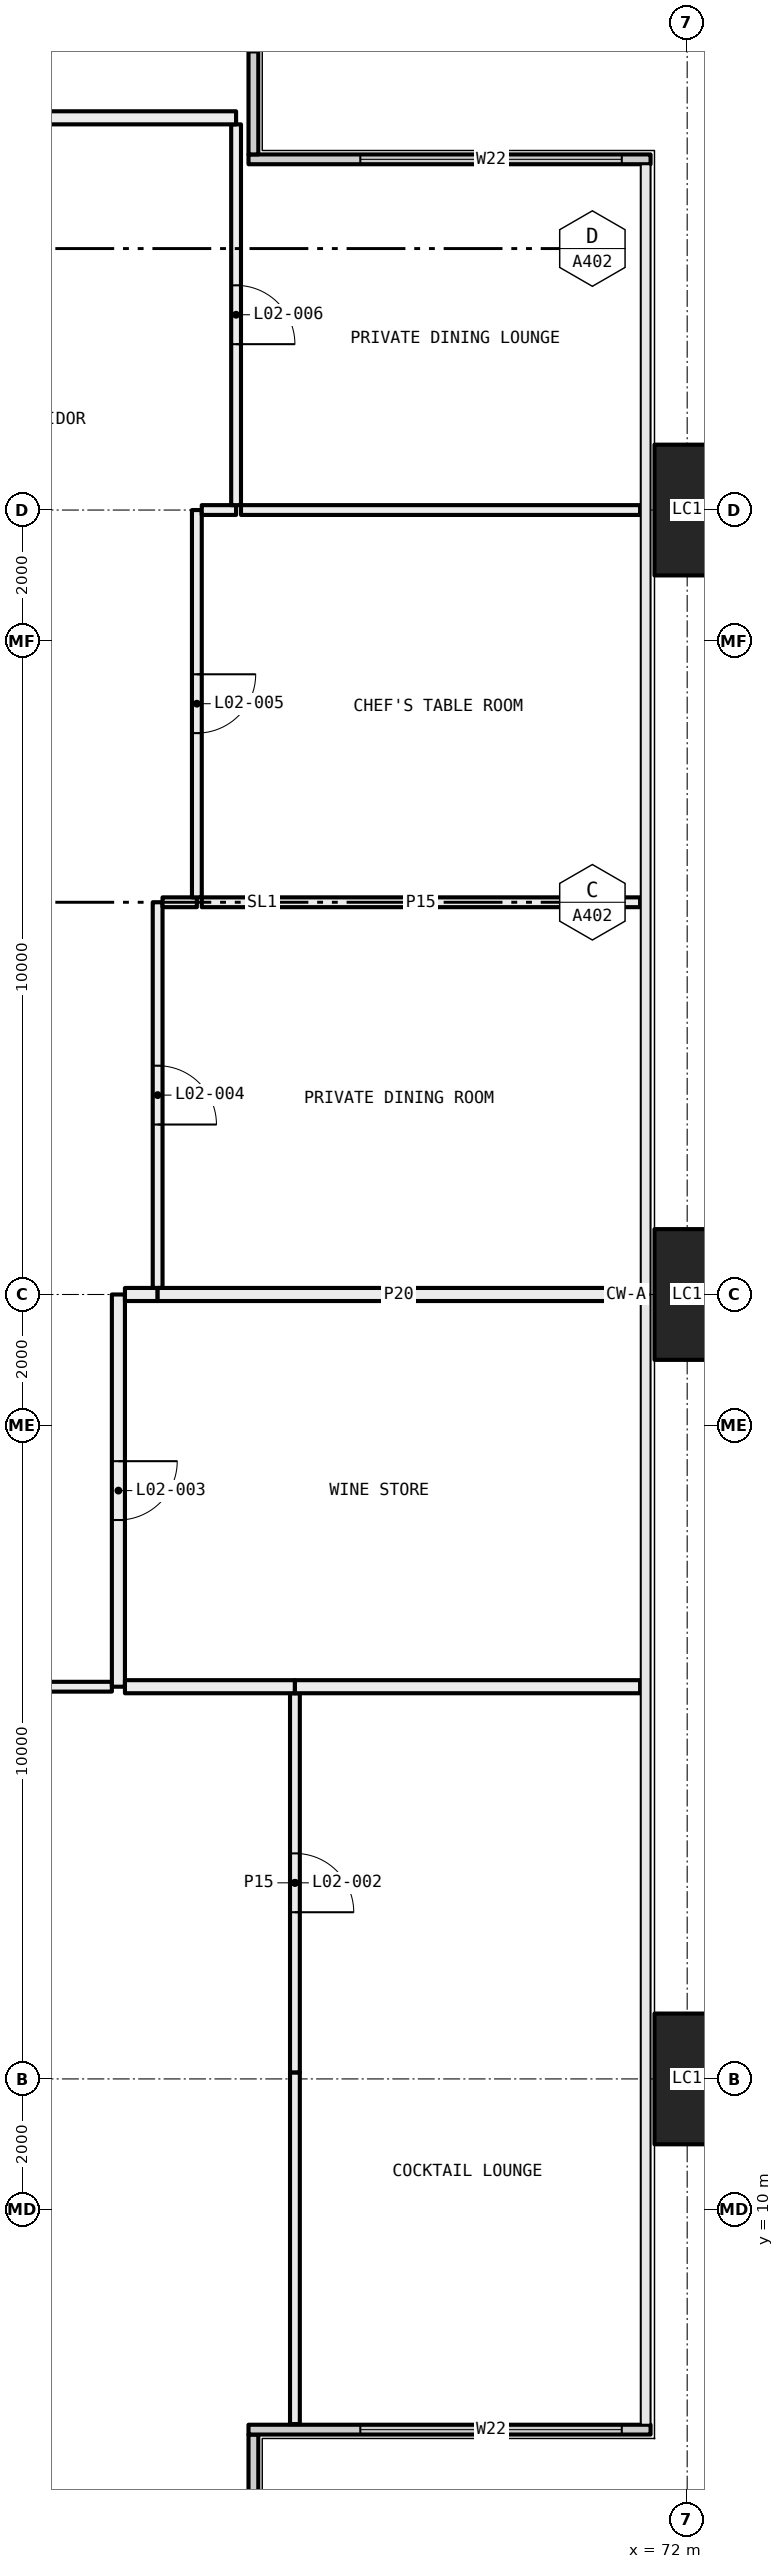
"""IFC4 building model, lengths in metres.
Left out: names, types, materials, properties, quantities, classifications, styles, units other than length and angle.
Written with IfcOpenShell. Run it as: python <this file> out.ifc"""

import sys

from ifc_helpers import new_model, si_unit, direction, frame, frame_2d, origin, origin_2d, place, context, subcontext, project, spatial, rectangle, hollow_rectangle, extrude, element, fill, save


model = new_model("IFC4")
c1 = context("Model", 3, precision=1e-05, world=origin(), true_north=direction((0.0, 1.0)))
c2 = subcontext(c1, "Body", "Model", "MODEL_VIEW")
j1 = project(units=[si_unit("LENGTHUNIT", "METRE"), si_unit("PLANEANGLEUNIT", "RADIAN")], contexts=[c1])
p1 = place(None, origin())
s1 = spatial("IfcSite", under=j1, at=p1, CompositionType="ELEMENT")
p2 = place(p1, origin())
s2 = spatial("IfcBuilding", under=s1, at=p2, CompositionType="ELEMENT")
p3 = place(p2, frame((0.0, 0.0, 12.0)))
s3 = spatial("IfcBuildingStorey", under=s2, at=p3, CompositionType="ELEMENT", Elevation=12.0)
for number, where, z_axis, x_axis in (
    (1, (72.0, 12.0, -0.4), (0.0, 0.0, 1.0), (0.0, 1.0, 0.0)),
    (2, (72.0, 24.0, -0.4), (0.0, 0.0, 1.0), (0.0, 1.0, 0.0)),
    (3, (72.0, 36.0, -0.4), (0.0, 0.0, 1.0), (0.0, 1.0, 0.0)),
):
    element("IfcColumn", number, at=place(p3, frame(where, z_axis=z_axis, x_axis=x_axis)), inside=s3, PredefinedType="COLUMN", context=c2, shape_type="SweptSolid", body=[
        extrude(hollow_rectangle(XDim=2.0, YDim=1.0, WallThickness=0.08, at=origin_2d()), origin(), (0.0, 0.0, 1.0), 6.0),
    ])
p4 = place(p3, frame((65.365, 0.71, 0.0), z_axis=(0.0, 0.0, 1.0), x_axis=(0.0, 1.0, 0.0)))
e4 = element("IfcWall", 4, at=p4, inside=s3, PredefinedType="ELEMENTEDWALL", context=c2, shape_type="SweptSolid", body=[
    extrude(rectangle(XDim=5.85, YDim=0.15, at=frame_2d((2.925, 0.0))), origin(), (0.0, 0.0, 1.0), 5.6),
])
p5 = place(p4, frame((0.29, 0.0, 0.45)))
e5 = element("IfcOpeningElement", 5, at=p5, cuts=e4, PredefinedType="OPENING", context=c2, shape_type="SweptSolid", body=[
    extrude(rectangle(XDim=4.0, YDim=5.1, at=frame_2d((2.0, 2.55))), frame((0.0, 0.085, 0.0), z_axis=(0.0, -1.0, 0.0), x_axis=(1.0, 0.0, 0.0)), (0.0, 0.0, 1.0), 0.17),
])
p6 = place(p3, frame((65.29, 6.635, 0.0), z_axis=(0.0, 0.0, 1.0), x_axis=(1.0, 0.0, 0.0)))
e6 = element("IfcWall", 6, at=p6, inside=s3, PredefinedType="ELEMENTEDWALL", context=c2, shape_type="SweptSolid", body=[
    extrude(rectangle(XDim=6.15, YDim=0.15, at=frame_2d((3.075, 0.0))), origin(), (0.0, 0.0, 1.0), 5.6),
])
p7 = place(p6, frame((1.71, 0.0, 0.45)))
e7 = element("IfcOpeningElement", 7, at=p7, cuts=e6, PredefinedType="OPENING", context=c2, shape_type="SweptSolid", body=[
    extrude(rectangle(XDim=4.0, YDim=5.1, at=frame_2d((2.0, 2.55))), frame((0.0, 0.085, 0.0), z_axis=(0.0, -1.0, 0.0), x_axis=(1.0, 0.0, 0.0)), (0.0, 0.0, 1.0), 0.17),
])
p8 = place(p3, frame((65.29, 41.365, 0.0), z_axis=(0.0, 0.0, 1.0), x_axis=(1.0, 0.0, 0.0)))
e8 = element("IfcWall", 8, at=p8, inside=s3, PredefinedType="ELEMENTEDWALL", context=c2, shape_type="SweptSolid", body=[
    extrude(rectangle(XDim=6.15, YDim=0.15, at=frame_2d((3.075, 0.0))), origin(), (0.0, 0.0, 1.0), 5.6),
])
p9 = place(p8, frame((1.71, 0.0, 0.45)))
e9 = element("IfcOpeningElement", 9, at=p9, cuts=e8, PredefinedType="OPENING", context=c2, shape_type="SweptSolid", body=[
    extrude(rectangle(XDim=4.0, YDim=5.1, at=frame_2d((2.0, 2.55))), frame((0.0, 0.085, 0.0), z_axis=(0.0, -1.0, 0.0), x_axis=(1.0, 0.0, 0.0)), (0.0, 0.0, 1.0), 0.17),
])
p10 = place(p3, frame((65.365, 41.44, 0.0), z_axis=(0.0, 0.0, 1.0), x_axis=(0.0, 1.0, 0.0)))
e10 = element("IfcWall", 10, at=p10, inside=s3, PredefinedType="ELEMENTEDWALL", context=c2, shape_type="SweptSolid", body=[
    extrude(rectangle(XDim=5.85, YDim=0.15, at=frame_2d((2.925, 0.0))), origin(), (0.0, 0.0, 1.0), 5.6),
])
p11 = place(p10, frame((1.56, 0.0, 0.45)))
e11 = element("IfcOpeningElement", 11, at=p11, cuts=e10, PredefinedType="OPENING", context=c2, shape_type="SweptSolid", body=[
    extrude(rectangle(XDim=4.0, YDim=5.1, at=frame_2d((2.0, 2.55))), frame((0.0, 0.085, 0.0), z_axis=(0.0, -1.0, 0.0), x_axis=(1.0, 0.0, 0.0)), (0.0, 0.0, 1.0), 0.17),
])
p12 = place(p3, frame((48.72, 18.0, 0.0), z_axis=(0.0, 0.0, 1.0), x_axis=(1.0, 0.0, 0.0)))
e12 = element("IfcWall", 12, at=p12, inside=s3, PredefinedType="PARTITIONING", context=c2, shape_type="SweptSolid", body=[
    extrude(rectangle(XDim=14.48, YDim=0.15, at=frame_2d((7.24, 0.0))), origin(), (0.0, 0.0, 1.0), 5.6),
])
p13 = place(p12, frame((6.44, 0.0, 0.0)))
e13 = element("IfcOpeningElement", 13, at=p13, cuts=e12, PredefinedType="OPENING", context=c2, shape_type="SweptSolid", body=[
    extrude(rectangle(XDim=1.6, YDim=2.1, at=frame_2d((0.8, 1.05))), frame((0.0, 0.085, 0.0), z_axis=(0.0, -1.0, 0.0), x_axis=(1.0, 0.0, 0.0)), (0.0, 0.0, 1.0), 0.17),
])
p14 = place(p3, frame((63.3, 18.0, 0.0), z_axis=(0.0, 0.0, 1.0), x_axis=(0.0, 1.0, 0.0)))
e14 = element("IfcWall", 14, at=p14, inside=s3, PredefinedType="PARTITIONING", context=c2, shape_type="SweptSolid", body=[
    extrude(rectangle(XDim=6.0, YDim=0.2, at=frame_2d((3.0, 0.0))), origin(), (0.0, 0.0, 1.0), 5.0),
])
p15 = place(p14, frame((2.55, 0.0, 0.0)))
e15 = element("IfcOpeningElement", 15, at=p15, cuts=e14, PredefinedType="OPENING", context=c2, shape_type="SweptSolid", body=[
    extrude(rectangle(XDim=0.9, YDim=2.1, at=frame_2d((0.45, 1.05))), frame((0.0, 0.11, 0.0), z_axis=(0.0, -1.0, 0.0), x_axis=(1.0, 0.0, 0.0)), (0.0, 0.0, 1.0), 0.22),
])
p16 = place(p3, frame((63.4, 24.0, 0.0), z_axis=(0.0, 0.0, 1.0), x_axis=(1.0, 0.0, 0.0)))
e16 = element("IfcWall", 16, at=p16, inside=s3, PredefinedType="PARTITIONING", context=c2, shape_type="SweptSolid", body=[
    extrude(rectangle(XDim=0.5, YDim=0.2, at=frame_2d((0.25, 0.0))), origin(), (0.0, 0.0, 1.0), 5.0),
])
p17 = place(p3, frame((63.9, 24.1, 0.0), z_axis=(0.0, 0.0, 1.0), x_axis=(0.0, 1.0, 0.0)))
e17 = element("IfcWall", 17, at=p17, inside=s3, PredefinedType="PARTITIONING", context=c2, shape_type="SweptSolid", body=[
    extrude(rectangle(XDim=5.9, YDim=0.15, at=frame_2d((2.95, 0.0))), origin(), (0.0, 0.0, 1.0), 5.6),
])
p18 = place(p17, frame((2.5, 0.0, 0.0)))
e18 = element("IfcOpeningElement", 18, at=p18, cuts=e17, PredefinedType="OPENING", context=c2, shape_type="SweptSolid", body=[
    extrude(rectangle(XDim=0.9, YDim=2.1, at=frame_2d((0.45, 1.05))), frame((0.0, 0.085, 0.0), z_axis=(0.0, -1.0, 0.0), x_axis=(1.0, 0.0, 0.0)), (0.0, 0.0, 1.0), 0.17),
])
p19 = place(p3, frame((63.975, 30.0, 0.0), z_axis=(0.0, 0.0, 1.0), x_axis=(1.0, 0.0, 0.0)))
e19 = element("IfcWall", 19, at=p19, inside=s3, PredefinedType="PARTITIONING", context=c2, shape_type="SweptSolid", body=[
    extrude(rectangle(XDim=0.525, YDim=0.15, at=frame_2d((0.262, 0.0))), origin(), (0.0, 0.0, 1.0), 5.6),
])
p20 = place(p3, frame((64.5, 30.075, 0.0), z_axis=(0.0, 0.0, 1.0), x_axis=(0.0, 1.0, 0.0)))
e20 = element("IfcWall", 20, at=p20, inside=s3, PredefinedType="PARTITIONING", context=c2, shape_type="SweptSolid", body=[
    extrude(rectangle(XDim=5.925, YDim=0.15, at=frame_2d((2.962, 0.0))), origin(), (0.0, 0.0, 1.0), 5.0),
])
p21 = place(p20, frame((2.512, 0.0, 0.0)))
e21 = element("IfcOpeningElement", 21, at=p21, cuts=e20, PredefinedType="OPENING", context=c2, shape_type="SweptSolid", body=[
    extrude(rectangle(XDim=0.9, YDim=2.1, at=frame_2d((0.45, 1.05))), frame((0.0, 0.085, 0.0), z_axis=(0.0, -1.0, 0.0), x_axis=(1.0, 0.0, 0.0)), (0.0, 0.0, 1.0), 0.17),
])
p22 = place(p3, frame((64.575, 36.0, 0.0), z_axis=(0.0, 0.0, 1.0), x_axis=(1.0, 0.0, 0.0)))
e22 = element("IfcWall", 22, at=p22, inside=s3, PredefinedType="PARTITIONING", context=c2, shape_type="SweptSolid", body=[
    extrude(rectangle(XDim=0.525, YDim=0.15, at=frame_2d((0.263, 0.0))), origin(), (0.0, 0.0, 1.0), 5.0),
])
p23 = place(p3, frame((65.1, 36.075, 0.0), z_axis=(0.0, 0.0, 1.0), x_axis=(0.0, 1.0, 0.0)))
e23 = element("IfcWall", 23, at=p23, inside=s3, PredefinedType="PARTITIONING", context=c2, shape_type="SweptSolid", body=[
    extrude(rectangle(XDim=5.825, YDim=0.15, at=frame_2d((2.913, 0.0))), origin(), (0.0, 0.0, 1.0), 5.0),
])
p24 = place(p23, frame((2.462, 0.0, 0.0)))
e24 = element("IfcOpeningElement", 24, at=p24, cuts=e23, PredefinedType="OPENING", context=c2, shape_type="SweptSolid", body=[
    extrude(rectangle(XDim=0.9, YDim=2.1, at=frame_2d((0.45, 1.05))), frame((0.0, 0.085, 0.0), z_axis=(0.0, -1.0, 0.0), x_axis=(1.0, 0.0, 0.0)), (0.0, 0.0, 1.0), 0.17),
])
p25 = place(p3, frame((65.1, 42.0, 0.0), z_axis=(0.0, 0.0, 1.0), x_axis=(-1.0, 0.0, 0.0)))
e25 = element("IfcWall", 25, at=p25, inside=s3, PredefinedType="PARTITIONING", context=c2, shape_type="SweptSolid", body=[
    extrude(rectangle(XDim=11.1, YDim=0.2, at=frame_2d((5.55, 0.0))), origin(), (0.0, 0.0, 1.0), 5.6),
])
p26 = place(p25, frame((5.1, 0.0, 0.0)))
e26 = element("IfcOpeningElement", 26, at=p26, cuts=e25, PredefinedType="OPENING", context=c2, shape_type="SweptSolid", body=[
    extrude(rectangle(XDim=0.9, YDim=2.1, at=frame_2d((0.45, 1.05))), frame((0.0, 0.11, 0.0), z_axis=(0.0, -1.0, 0.0), x_axis=(1.0, 0.0, 0.0)), (0.0, 0.0, 1.0), 0.22),
])
p27 = place(p3, frame((66.0, 6.72, 0.0), z_axis=(0.0, 0.0, 1.0), x_axis=(0.0, 1.0, 0.0)))
e27 = element("IfcWall", 27, at=p27, inside=s3, PredefinedType="PARTITIONING", context=c2, shape_type="SweptSolid", body=[
    extrude(rectangle(XDim=5.38, YDim=0.15, at=frame_2d((2.69, 0.0))), origin(), (0.0, 0.0, 1.0), 5.0),
])
p28 = place(p3, frame((66.0, 12.1, 0.0), z_axis=(0.0, 0.0, 1.0), x_axis=(0.0, 1.0, 0.0)))
e28 = element("IfcWall", 28, at=p28, inside=s3, PredefinedType="PARTITIONING", context=c2, shape_type="SweptSolid", body=[
    extrude(rectangle(XDim=5.8, YDim=0.15, at=frame_2d((2.9, 0.0))), origin(), (0.0, 0.0, 1.0), 5.6),
])
p29 = place(p28, frame((2.45, 0.0, 0.0)))
e29 = element("IfcOpeningElement", 29, at=p29, cuts=e28, PredefinedType="OPENING", context=c2, shape_type="SweptSolid", body=[
    extrude(rectangle(XDim=0.9, YDim=2.1, at=frame_2d((0.45, 1.05))), frame((0.0, 0.085, 0.0), z_axis=(0.0, -1.0, 0.0), x_axis=(1.0, 0.0, 0.0)), (0.0, 0.0, 1.0), 0.17),
])
p30 = place(p3, frame((66.0, 18.0, 0.0), z_axis=(0.0, 0.0, 1.0), x_axis=(-1.0, 0.0, 0.0)))
e30 = element("IfcWall", 30, at=p30, inside=s3, PredefinedType="PARTITIONING", context=c2, shape_type="SweptSolid", body=[
    extrude(rectangle(XDim=2.6, YDim=0.2, at=frame_2d((1.3, 0.0))), origin(), (0.0, 0.0, 1.0), 5.6),
])
p31 = place(p3, frame((71.28, 18.0, 0.0), z_axis=(0.0, 0.0, 1.0), x_axis=(-1.0, 0.0, 0.0)))
e31 = element("IfcWall", 31, at=p31, inside=s3, PredefinedType="PARTITIONING", context=c2, shape_type="SweptSolid", body=[
    extrude(rectangle(XDim=5.28, YDim=0.2, at=frame_2d((2.64, 0.0))), origin(), (0.0, 0.0, 1.0), 5.6),
])
p32 = place(p3, frame((71.28, 24.0, 0.0), z_axis=(0.0, 0.0, 1.0), x_axis=(-1.0, 0.0, 0.0)))
e32 = element("IfcWall", 32, at=p32, inside=s3, PredefinedType="PARTITIONING", context=c2, shape_type="SweptSolid", body=[
    extrude(rectangle(XDim=7.38, YDim=0.2, at=frame_2d((3.69, 0.0))), origin(), (0.0, 0.0, 1.0), 5.0),
])
p33 = place(p3, frame((71.28, 30.0, 0.0), z_axis=(0.0, 0.0, 1.0), x_axis=(-1.0, 0.0, 0.0)))
e33 = element("IfcWall", 33, at=p33, inside=s3, PredefinedType="PARTITIONING", context=c2, shape_type="SweptSolid", body=[
    extrude(rectangle(XDim=6.705, YDim=0.15, at=frame_2d((3.353, 0.0))), origin(), (0.0, 0.0, 1.0), 5.6),
])
p34 = place(p3, frame((71.28, 36.0, 0.0), z_axis=(0.0, 0.0, 1.0), x_axis=(-1.0, 0.0, 0.0)))
e34 = element("IfcWall", 34, at=p34, inside=s3, PredefinedType="PARTITIONING", context=c2, shape_type="SweptSolid", body=[
    extrude(rectangle(XDim=6.105, YDim=0.15, at=frame_2d((3.052, 0.0))), origin(), (0.0, 0.0, 1.0), 5.0),
])
p35 = place(p7, origin())
e35 = element("IfcWindow", 35, at=p35, inside=s3, PartitioningType="SINGLE_PANEL", PredefinedType="WINDOW", context=c2, shape_type="SweptSolid", body=[
    extrude(rectangle(XDim=4.0, YDim=5.1, at=frame_2d((2.0, 2.55))), frame((0.0, 0.03, 0.0), z_axis=(0.0, -1.0, 0.0), x_axis=(1.0, 0.0, 0.0)), (0.0, 0.0, 1.0), 0.06),
])
fill(e7, e35)
p36 = place(p9, origin())
e36 = element("IfcWindow", 36, at=p36, inside=s3, PartitioningType="SINGLE_PANEL", PredefinedType="WINDOW", context=c2, shape_type="SweptSolid", body=[
    extrude(rectangle(XDim=4.0, YDim=5.1, at=frame_2d((2.0, 2.55))), frame((0.0, 0.03, 0.0), z_axis=(0.0, -1.0, 0.0), x_axis=(1.0, 0.0, 0.0)), (0.0, 0.0, 1.0), 0.06),
])
fill(e9, e36)
p37 = place(p29, frame((0.9, 0.0, 0.0), x_axis=(-1.0, 0.0, 0.0)))
e37 = element("IfcDoor", 37, at=p37, inside=s3, OperationType="SINGLE_SWING_LEFT", PredefinedType="DOOR", context=c2, shape_type="SweptSolid", body=[
    extrude(rectangle(XDim=0.9, YDim=2.1, at=frame_2d((0.45, 1.05))), frame((0.0, 0.025, 0.0), z_axis=(0.0, -1.0, 0.0), x_axis=(1.0, 0.0, 0.0)), (0.0, 0.0, 1.0), 0.05),
])
fill(e29, e37)
p38 = place(p15, frame((0.9, 0.0, 0.0), x_axis=(-1.0, 0.0, 0.0)))
e38 = element("IfcDoor", 38, at=p38, inside=s3, OperationType="SINGLE_SWING_RIGHT", PredefinedType="DOOR", context=c2, shape_type="SweptSolid", body=[
    extrude(rectangle(XDim=0.9, YDim=2.1, at=frame_2d((0.45, 1.05))), frame((0.0, 0.025, 0.0), z_axis=(0.0, -1.0, 0.0), x_axis=(1.0, 0.0, 0.0)), (0.0, 0.0, 1.0), 0.05),
])
fill(e15, e38)
p39 = place(p18, frame((0.9, 0.0, 0.0), x_axis=(-1.0, 0.0, 0.0)))
e39 = element("IfcDoor", 39, at=p39, inside=s3, OperationType="SINGLE_SWING_LEFT", PredefinedType="DOOR", context=c2, shape_type="SweptSolid", body=[
    extrude(rectangle(XDim=0.9, YDim=2.1, at=frame_2d((0.45, 1.05))), frame((0.0, 0.025, 0.0), z_axis=(0.0, -1.0, 0.0), x_axis=(1.0, 0.0, 0.0)), (0.0, 0.0, 1.0), 0.05),
])
fill(e18, e39)
p40 = place(p21, frame((0.9, 0.0, 0.0), x_axis=(-1.0, 0.0, 0.0)))
e40 = element("IfcDoor", 40, at=p40, inside=s3, OperationType="SINGLE_SWING_RIGHT", PredefinedType="DOOR", context=c2, shape_type="SweptSolid", body=[
    extrude(rectangle(XDim=0.9, YDim=2.1, at=frame_2d((0.45, 1.05))), frame((0.0, 0.025, 0.0), z_axis=(0.0, -1.0, 0.0), x_axis=(1.0, 0.0, 0.0)), (0.0, 0.0, 1.0), 0.05),
])
fill(e21, e40)
p41 = place(p24, frame((0.9, 0.0, 0.0), x_axis=(-1.0, 0.0, 0.0)))
e41 = element("IfcDoor", 41, at=p41, inside=s3, OperationType="SINGLE_SWING_LEFT", PredefinedType="DOOR", context=c2, shape_type="SweptSolid", body=[
    extrude(rectangle(XDim=0.9, YDim=2.1, at=frame_2d((0.45, 1.05))), frame((0.0, 0.025, 0.0), z_axis=(0.0, -1.0, 0.0), x_axis=(1.0, 0.0, 0.0)), (0.0, 0.0, 1.0), 0.05),
])
fill(e24, e41)
save(model, sys.argv[1])
